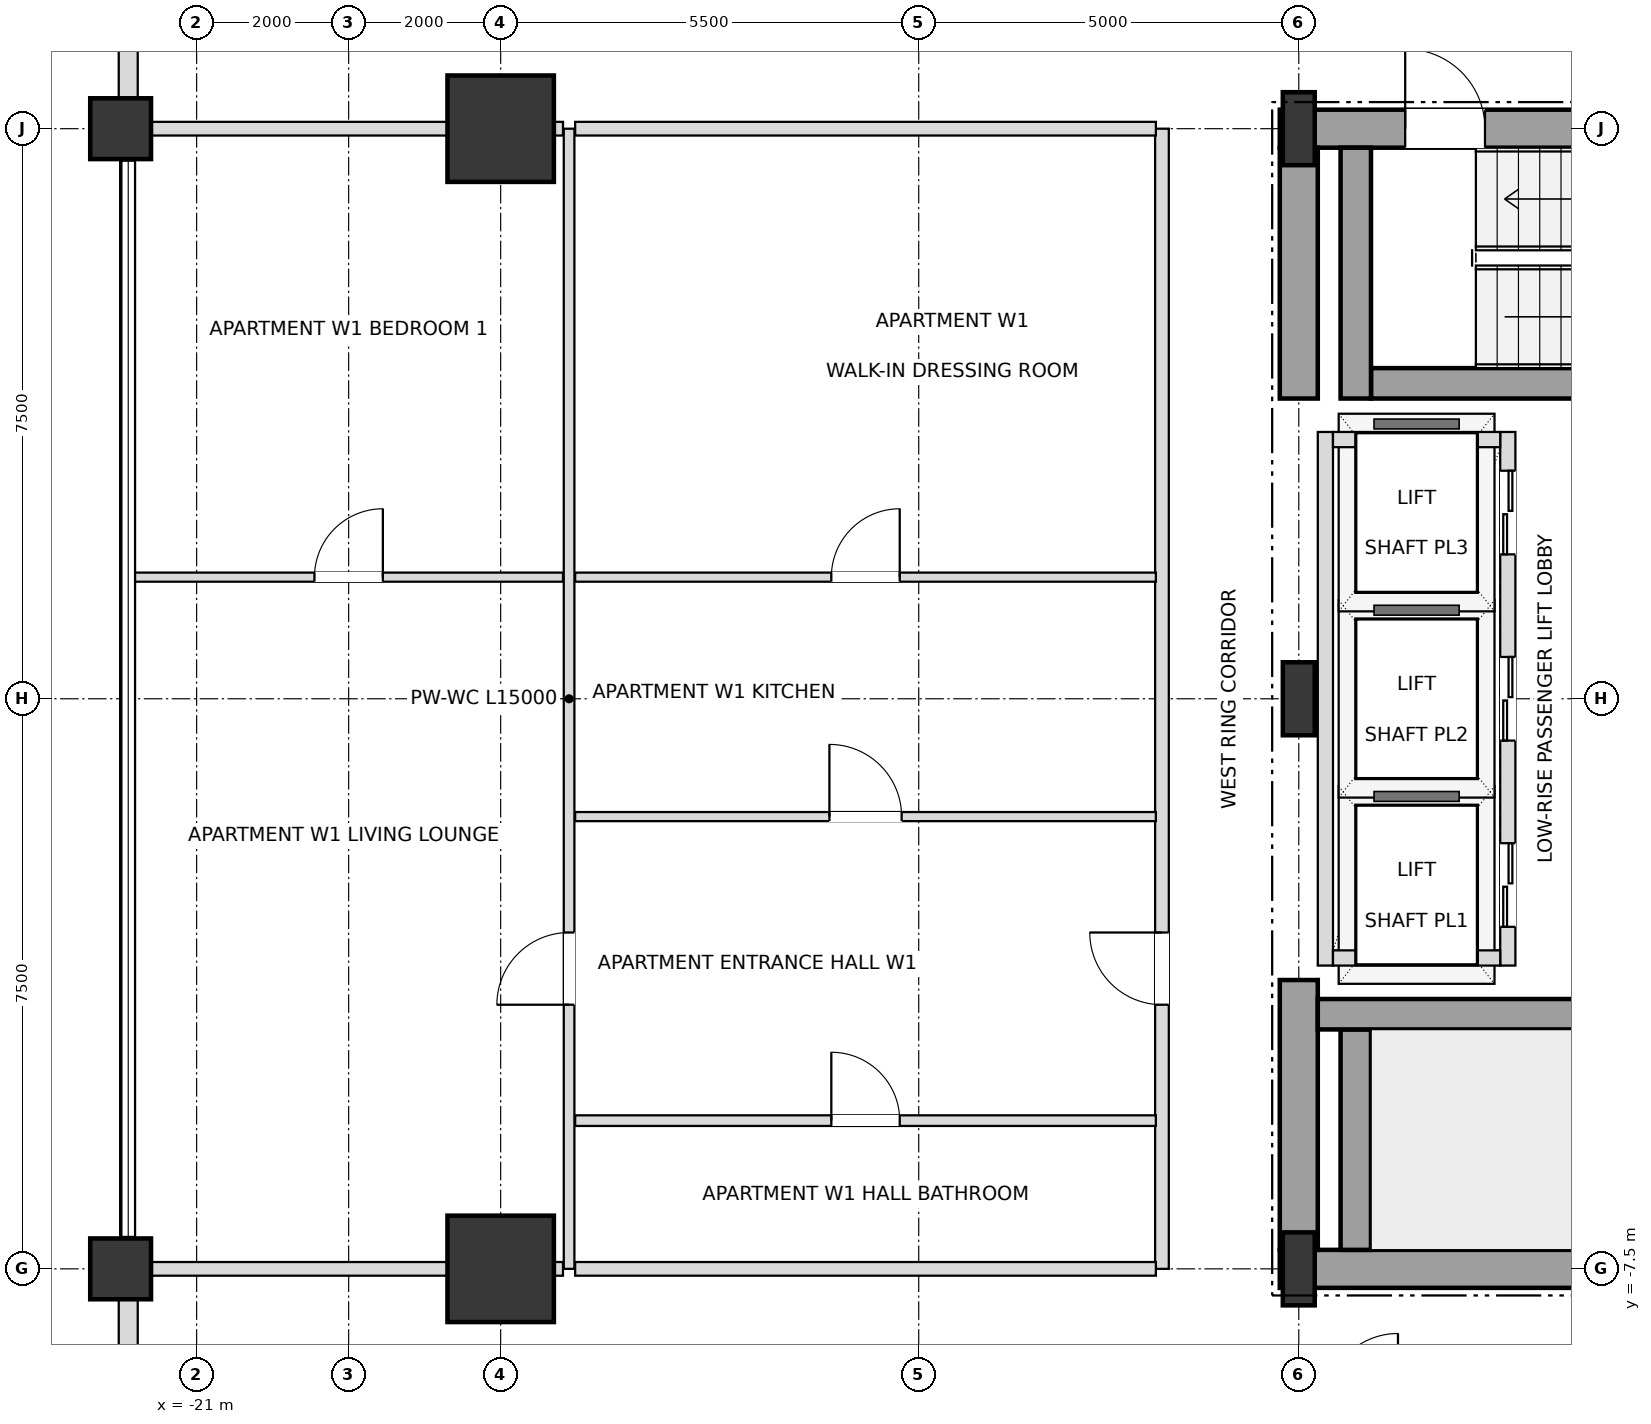
"""IFC4 building model, lengths in metres.
Left out: names, types, materials, properties, quantities, classifications, styles, units other than length and angle.
Written with IfcOpenShell. Run it as: python <this file> out.ifc"""

import sys

from ifc_helpers import new_model, si_unit, direction, frame, frame_2d, origin, origin_2d, place, context, subcontext, project, spatial, rectangle, i_section, extrude, element, fill, save


model = new_model("IFC4")
c1 = context("Model", 3, precision=1e-05, world=origin(), true_north=direction((0.0, 1.0)))
c2 = subcontext(c1, "Body", "Model", "MODEL_VIEW")
j1 = project(units=[si_unit("LENGTHUNIT", "METRE"), si_unit("PLANEANGLEUNIT", "RADIAN")], contexts=[c1])
p1 = place(None, origin())
s1 = spatial("IfcSite", under=j1, at=p1, CompositionType="ELEMENT")
p2 = place(p1, origin())
s2 = spatial("IfcBuilding", under=s1, at=p2, CompositionType="ELEMENT")
p3 = place(p2, frame((0.0, 0.0, 46.8)))
s3 = spatial("IfcBuildingStorey", under=s2, at=p3, CompositionType="ELEMENT", Elevation=46.8)
for number, where, z_axis, x_axis in (
    (1, (-6.5, -7.5, 0.0), (0.0, 0.0, 1.0), (1.0, 0.0, 0.0)),
    (2, (-6.5, 0.0, 0.0), (0.0, 0.0, 1.0), (1.0, 0.0, 0.0)),
    (3, (-6.5, 7.5, 0.0), (0.0, 0.0, 1.0), (1.0, 0.0, 0.0)),
):
    element("IfcColumn", number, at=place(p3, frame(where, z_axis=z_axis, x_axis=x_axis)), inside=s3, PredefinedType="COLUMN", context=c2, shape_type="SweptSolid", body=[
        extrude(i_section(OverallWidth=0.42, OverallDepth=0.96, WebThickness=0.022, FlangeThickness=0.034, at=origin_2d()), origin(), (0.0, 0.0, 1.0), 3.6),
    ])
for number, where, z_axis, x_axis in (
    (4, (-17.0, 7.5, 0.0), (0.0, 0.0, 1.0), (1.0, 0.0, 0.0)),
    (5, (-17.0, -7.5, 0.0), (0.0, 0.0, 1.0), (1.0, 0.0, 0.0)),
):
    element("IfcColumn", number, at=place(p3, frame(where, z_axis=z_axis, x_axis=x_axis)), inside=s3, PredefinedType="USERDEFINED", context=c2, shape_type="SweptSolid", body=[
        extrude(rectangle(XDim=1.4, YDim=1.4, at=origin_2d()), origin(), (0.0, 0.0, 1.0), 3.6),
    ])
for number, where, z_axis, x_axis in (
    (6, (-22.0, -7.5, 0.0), (0.0, 0.0, 1.0), (1.0, 0.0, 0.0)),
    (7, (-22.0, 7.5, 0.0), (0.0, 0.0, 1.0), (1.0, 0.0, 0.0)),
):
    element("IfcColumn", number, at=place(p3, frame(where, z_axis=z_axis, x_axis=x_axis)), inside=s3, PredefinedType="COLUMN", context=c2, shape_type="SweptSolid", body=[
        extrude(rectangle(XDim=0.8, YDim=0.8, at=origin_2d()), origin(), (0.0, 0.0, 1.0), 3.6),
    ])
p4 = place(p3, frame((-21.9, 12.605, 0.0), z_axis=(0.0, 0.0, 1.0), x_axis=(0.0, -1.0, 0.0)))
e8 = element("IfcWall", 8, at=p4, inside=s3, PredefinedType="SOLIDWALL", context=c2, shape_type="SweptSolid", body=[
    extrude(rectangle(XDim=4.71, YDim=0.25, at=frame_2d((2.355, 0.0))), origin(), (0.0, 0.0, 1.0), 2.736),
])
p5 = place(p4, frame((1.455, 0.0, 0.72)))
e9 = element("IfcOpeningElement", 9, at=p5, cuts=e8, PredefinedType="OPENING", context=c2, shape_type="SweptSolid", body=[
    extrude(rectangle(XDim=1.8, YDim=1.68, at=frame_2d((0.9, 0.84))), frame((0.0, 0.135, 0.0), z_axis=(0.0, -1.0, 0.0), x_axis=(1.0, 0.0, 0.0)), (0.0, 0.0, 1.0), 0.27),
])
p6 = place(p3, frame((-21.9, -7.895, 0.0), z_axis=(0.0, 0.0, 1.0), x_axis=(0.0, -1.0, 0.0)))
e10 = element("IfcWall", 10, at=p6, inside=s3, PredefinedType="SOLIDWALL", context=c2, shape_type="SweptSolid", body=[
    extrude(rectangle(XDim=4.71, YDim=0.25, at=frame_2d((2.355, 0.0))), origin(), (0.0, 0.0, 1.0), 2.736),
])
p7 = place(p6, frame((1.455, 0.0, 0.72)))
e11 = element("IfcOpeningElement", 11, at=p7, cuts=e10, PredefinedType="OPENING", context=c2, shape_type="SweptSolid", body=[
    extrude(rectangle(XDim=1.8, YDim=1.68, at=frame_2d((0.9, 0.84))), frame((0.0, 0.135, 0.0), z_axis=(0.0, -1.0, 0.0), x_axis=(1.0, 0.0, 0.0)), (0.0, 0.0, 1.0), 0.27),
])
p8 = place(p3, frame((-6.75, -7.5, 0.0), z_axis=(0.0, 0.0, 1.0), x_axis=(1.0, 0.0, 0.0)))
e12 = element("IfcWall", 12, at=p8, inside=s3, PredefinedType="SHEAR", context=c2, shape_type="SweptSolid", body=[
    extrude(rectangle(XDim=6.75, YDim=0.5, at=frame_2d((3.375, 0.0))), origin(), (0.0, 0.0, 1.0), 3.38),
])
p9 = place(p3, frame((-6.75, 7.5, 0.0), z_axis=(0.0, 0.0, 1.0), x_axis=(1.0, 0.0, 0.0)))
e13 = element("IfcWall", 13, at=p9, inside=s3, PredefinedType="SHEAR", context=c2, shape_type="SweptSolid", body=[
    extrude(rectangle(XDim=6.75, YDim=0.5, at=frame_2d((3.375, 0.0))), origin(), (0.0, 0.0, 1.0), 3.38),
])
p10 = place(p9, frame((1.65, 0.0, 0.0)))
e14 = element("IfcOpeningElement", 14, at=p10, cuts=e13, PredefinedType="OPENING", context=c2, shape_type="SweptSolid", body=[
    extrude(rectangle(XDim=1.05, YDim=2.15, at=frame_2d((0.525, 1.075))), frame((0.0, 0.26, 0.0), z_axis=(0.0, -1.0, 0.0), x_axis=(1.0, 0.0, 0.0)), (0.0, 0.0, 1.0), 0.52),
])
p11 = place(p3, frame((-6.5, -7.25, 0.0), z_axis=(0.0, 0.0, 1.0), x_axis=(0.0, 1.0, 0.0)))
e15 = element("IfcWall", 15, at=p11, inside=s3, PredefinedType="SHEAR", context=c2, shape_type="SweptSolid", body=[
    extrude(rectangle(XDim=3.55, YDim=0.5, at=frame_2d((1.775, 0.0))), origin(), (0.0, 0.0, 1.0), 3.38),
])
p12 = place(p3, frame((-6.5, 3.95, 0.0), z_axis=(0.0, 0.0, 1.0), x_axis=(0.0, 1.0, 0.0)))
e16 = element("IfcWall", 16, at=p12, inside=s3, PredefinedType="SHEAR", context=c2, shape_type="SweptSolid", body=[
    extrude(rectangle(XDim=3.3, YDim=0.5, at=frame_2d((1.65, 0.0))), origin(), (0.0, 0.0, 1.0), 3.38),
])
p13 = place(p3, frame((-5.75, -7.25, 0.0), z_axis=(0.0, 0.0, 1.0), x_axis=(0.0, 1.0, 0.0)))
e17 = element("IfcWall", 17, at=p13, inside=s3, PredefinedType="SHEAR", context=c2, shape_type="SweptSolid", body=[
    extrude(rectangle(XDim=2.9, YDim=0.4, at=frame_2d((1.45, 0.0))), origin(), (0.0, 0.0, 1.0), 3.38),
])
p14 = place(p3, frame((-6.25, -4.15, 0.0), z_axis=(0.0, 0.0, 1.0), x_axis=(1.0, 0.0, 0.0)))
e18 = element("IfcWall", 18, at=p14, inside=s3, PredefinedType="SHEAR", context=c2, shape_type="SweptSolid", body=[
    extrude(rectangle(XDim=7.78, YDim=0.4, at=frame_2d((3.89, 0.0))), origin(), (0.0, 0.0, 1.0), 3.38),
])
p15 = place(p3, frame((-5.55, 4.15, 0.0), z_axis=(0.0, 0.0, 1.0), x_axis=(1.0, 0.0, 0.0)))
e19 = element("IfcWall", 19, at=p15, inside=s3, PredefinedType="SHEAR", context=c2, shape_type="SweptSolid", body=[
    extrude(rectangle(XDim=7.08, YDim=0.4, at=frame_2d((3.54, 0.0))), origin(), (0.0, 0.0, 1.0), 3.38),
])
p16 = place(p3, frame((-5.75, 3.95, 0.0), z_axis=(0.0, 0.0, 1.0), x_axis=(0.0, 1.0, 0.0)))
e20 = element("IfcWall", 20, at=p16, inside=s3, PredefinedType="SHEAR", context=c2, shape_type="SweptSolid", body=[
    extrude(rectangle(XDim=3.3, YDim=0.4, at=frame_2d((1.65, 0.0))), origin(), (0.0, 0.0, 1.0), 3.38),
])
p17 = place(p3, frame((-3.75, -3.51, 0.0), z_axis=(0.0, 0.0, 1.0), x_axis=(0.0, 1.0, 0.0)))
e21 = element("IfcWall", 21, at=p17, inside=s3, PredefinedType="SOLIDWALL", context=c2, shape_type="SweptSolid", body=[
    extrude(rectangle(XDim=7.02, YDim=0.2, at=frame_2d((3.51, 0.0))), origin(), (0.0, 0.0, 1.0), 3.38),
])
p18 = place(p17, frame((0.51, 0.0, 0.0)))
e22 = element("IfcOpeningElement", 22, at=p18, cuts=e21, PredefinedType="OPENING", context=c2, shape_type="SweptSolid", body=[
    extrude(rectangle(XDim=1.1, YDim=2.15, at=frame_2d((0.55, 1.075))), frame((0.0, 0.11, 0.0), z_axis=(0.0, -1.0, 0.0), x_axis=(1.0, 0.0, 0.0)), (0.0, 0.0, 1.0), 0.22),
])
p19 = place(p17, frame((2.96, 0.0, 0.0)))
e23 = element("IfcOpeningElement", 23, at=p19, cuts=e21, PredefinedType="OPENING", context=c2, shape_type="SweptSolid", body=[
    extrude(rectangle(XDim=1.1, YDim=2.15, at=frame_2d((0.55, 1.075))), frame((0.0, 0.11, 0.0), z_axis=(0.0, -1.0, 0.0), x_axis=(1.0, 0.0, 0.0)), (0.0, 0.0, 1.0), 0.22),
])
p20 = place(p17, frame((5.41, 0.0, 0.0)))
e24 = element("IfcOpeningElement", 24, at=p20, cuts=e21, PredefinedType="OPENING", context=c2, shape_type="SweptSolid", body=[
    extrude(rectangle(XDim=1.1, YDim=2.15, at=frame_2d((0.55, 1.075))), frame((0.0, 0.11, 0.0), z_axis=(0.0, -1.0, 0.0), x_axis=(1.0, 0.0, 0.0)), (0.0, 0.0, 1.0), 0.22),
])
p21 = place(p3, frame((-6.15, -3.51, 0.0), z_axis=(0.0, 0.0, 1.0), x_axis=(0.0, 1.0, 0.0)))
e25 = element("IfcWall", 25, at=p21, inside=s3, PredefinedType="SOLIDWALL", context=c2, shape_type="SweptSolid", body=[
    extrude(rectangle(XDim=7.02, YDim=0.2, at=frame_2d((3.51, 0.0))), origin(), (0.0, 0.0, 1.0), 3.38),
])
for number, where, z_axis, x_axis in (
    (26, (-6.05, -3.41, 0.0), (0.0, 0.0, 1.0), (1.0, 0.0, 0.0)),
    (27, (-6.05, 3.41, 0.0), (0.0, 0.0, 1.0), (1.0, 0.0, 0.0)),
):
    element("IfcWall", number, at=place(p3, frame(where, z_axis=z_axis, x_axis=x_axis)), inside=s3, PredefinedType="SOLIDWALL", context=c2, shape_type="SweptSolid", body=[
        extrude(rectangle(XDim=2.2, YDim=0.2, at=frame_2d((1.1, 0.0))), origin(), (0.0, 0.0, 1.0), 3.38),
    ])
p22 = place(p3, frame((-16.1, -7.5, 0.0), z_axis=(0.0, 0.0, 1.0), x_axis=(0.0, 1.0, 0.0)))
e28 = element("IfcWall", 28, at=p22, inside=s3, PredefinedType="PARTITIONING", context=c2, shape_type="SweptSolid", body=[
    extrude(rectangle(XDim=15.0, YDim=0.14, at=frame_2d((7.5, 0.0))), origin(), (0.0, 0.0, 1.0), 3.38),
])
p23 = place(p22, frame((3.475, 0.0, 0.0)))
e29 = element("IfcOpeningElement", 29, at=p23, cuts=e28, PredefinedType="OPENING", context=c2, shape_type="SweptSolid", body=[
    extrude(rectangle(XDim=0.95, YDim=2.1, at=frame_2d((0.475, 1.05))), frame((0.0, 0.08, 0.0), z_axis=(0.0, -1.0, 0.0), x_axis=(1.0, 0.0, 0.0)), (0.0, 0.0, 1.0), 0.16),
])
p24 = place(p3, frame((-8.3, -7.5, 0.0), z_axis=(0.0, 0.0, 1.0), x_axis=(0.0, 1.0, 0.0)))
e30 = element("IfcWall", 30, at=p24, inside=s3, PredefinedType="PARTITIONING", context=c2, shape_type="SweptSolid", body=[
    extrude(rectangle(XDim=15.0, YDim=0.18, at=frame_2d((7.5, 0.0))), origin(), (0.0, 0.0, 1.0), 3.38),
])
p25 = place(p24, frame((3.475, 0.0, 0.0)))
e31 = element("IfcOpeningElement", 31, at=p25, cuts=e30, PredefinedType="OPENING", context=c2, shape_type="SweptSolid", body=[
    extrude(rectangle(XDim=0.95, YDim=2.15, at=frame_2d((0.475, 1.075))), frame((0.0, 0.1, 0.0), z_axis=(0.0, -1.0, 0.0), x_axis=(1.0, 0.0, 0.0)), (0.0, 0.0, 1.0), 0.2),
])
p26 = place(p3, frame((-21.9, -7.5, 0.0), z_axis=(0.0, 0.0, 1.0), x_axis=(1.0, 0.0, 0.0)))
e32 = element("IfcWall", 32, at=p26, inside=s3, PredefinedType="PARTITIONING", context=c2, shape_type="SweptSolid", body=[
    extrude(rectangle(XDim=5.72, YDim=0.18, at=frame_2d((2.86, 0.0))), origin(), (0.0, 0.0, 1.0), 2.816),
])
p27 = place(p3, frame((-16.02, -7.5, 0.0), z_axis=(0.0, 0.0, 1.0), x_axis=(1.0, 0.0, 0.0)))
e33 = element("IfcWall", 33, at=p27, inside=s3, PredefinedType="PARTITIONING", context=c2, shape_type="SweptSolid", body=[
    extrude(rectangle(XDim=7.64, YDim=0.18, at=frame_2d((3.82, 0.0))), origin(), (0.0, 0.0, 1.0), 2.816),
])
p28 = place(p3, frame((-16.02, -5.55, 0.0), z_axis=(0.0, 0.0, 1.0), x_axis=(1.0, 0.0, 0.0)))
e34 = element("IfcWall", 34, at=p28, inside=s3, PredefinedType="PARTITIONING", context=c2, shape_type="SweptSolid", body=[
    extrude(rectangle(XDim=7.64, YDim=0.14, at=frame_2d((3.82, 0.0))), origin(), (0.0, 0.0, 1.0), 2.948),
])
p29 = place(p28, frame((3.37, 0.0, 0.0)))
e35 = element("IfcOpeningElement", 35, at=p29, cuts=e34, PredefinedType="OPENING", context=c2, shape_type="SweptSolid", body=[
    extrude(rectangle(XDim=0.9, YDim=2.1, at=frame_2d((0.45, 1.05))), frame((0.0, 0.08, 0.0), z_axis=(0.0, -1.0, 0.0), x_axis=(1.0, 0.0, 0.0)), (0.0, 0.0, 1.0), 0.16),
])
p30 = place(p3, frame((-16.02, -1.55, 0.0), z_axis=(0.0, 0.0, 1.0), x_axis=(1.0, 0.0, 0.0)))
e36 = element("IfcWall", 36, at=p30, inside=s3, PredefinedType="PARTITIONING", context=c2, shape_type="SweptSolid", body=[
    extrude(rectangle(XDim=7.64, YDim=0.12, at=frame_2d((3.82, 0.0))), origin(), (0.0, 0.0, 1.0), 2.948),
])
p31 = place(p30, frame((3.345, 0.0, 0.0)))
e37 = element("IfcOpeningElement", 37, at=p31, cuts=e36, PredefinedType="OPENING", context=c2, shape_type="SweptSolid", body=[
    extrude(rectangle(XDim=0.95, YDim=2.1, at=frame_2d((0.475, 1.05))), frame((0.0, 0.07, 0.0), z_axis=(0.0, -1.0, 0.0), x_axis=(1.0, 0.0, 0.0)), (0.0, 0.0, 1.0), 0.14),
])
p32 = place(p3, frame((-21.82, 1.6, 0.0), z_axis=(0.0, 0.0, 1.0), x_axis=(1.0, 0.0, 0.0)))
e38 = element("IfcWall", 38, at=p32, inside=s3, PredefinedType="PARTITIONING", context=c2, shape_type="SweptSolid", body=[
    extrude(rectangle(XDim=5.64, YDim=0.12, at=frame_2d((2.82, 0.0))), origin(), (0.0, 0.0, 1.0), 2.816),
])
p33 = place(p32, frame((2.37, 0.0, 0.0)))
e39 = element("IfcOpeningElement", 39, at=p33, cuts=e38, PredefinedType="OPENING", context=c2, shape_type="SweptSolid", body=[
    extrude(rectangle(XDim=0.9, YDim=2.1, at=frame_2d((0.45, 1.05))), frame((0.0, 0.07, 0.0), z_axis=(0.0, -1.0, 0.0), x_axis=(1.0, 0.0, 0.0)), (0.0, 0.0, 1.0), 0.14),
])
p34 = place(p3, frame((-16.02, 1.6, 0.0), z_axis=(0.0, 0.0, 1.0), x_axis=(1.0, 0.0, 0.0)))
e40 = element("IfcWall", 40, at=p34, inside=s3, PredefinedType="PARTITIONING", context=c2, shape_type="SweptSolid", body=[
    extrude(rectangle(XDim=7.64, YDim=0.12, at=frame_2d((3.82, 0.0))), origin(), (0.0, 0.0, 1.0), 2.948),
])
p35 = place(p34, frame((3.37, 0.0, 0.0)))
e41 = element("IfcOpeningElement", 41, at=p35, cuts=e40, PredefinedType="OPENING", context=c2, shape_type="SweptSolid", body=[
    extrude(rectangle(XDim=0.9, YDim=2.1, at=frame_2d((0.45, 1.05))), frame((0.0, 0.07, 0.0), z_axis=(0.0, -1.0, 0.0), x_axis=(1.0, 0.0, 0.0)), (0.0, 0.0, 1.0), 0.14),
])
p36 = place(p3, frame((-21.9, 7.5, 0.0), z_axis=(0.0, 0.0, 1.0), x_axis=(1.0, 0.0, 0.0)))
e42 = element("IfcWall", 42, at=p36, inside=s3, PredefinedType="PARTITIONING", context=c2, shape_type="SweptSolid", body=[
    extrude(rectangle(XDim=5.72, YDim=0.18, at=frame_2d((2.86, 0.0))), origin(), (0.0, 0.0, 1.0), 2.816),
])
p37 = place(p3, frame((-16.02, 7.5, 0.0), z_axis=(0.0, 0.0, 1.0), x_axis=(1.0, 0.0, 0.0)))
e43 = element("IfcWall", 43, at=p37, inside=s3, PredefinedType="PARTITIONING", context=c2, shape_type="SweptSolid", body=[
    extrude(rectangle(XDim=7.64, YDim=0.18, at=frame_2d((3.82, 0.0))), origin(), (0.0, 0.0, 1.0), 2.816),
])
p38 = place(p10, origin())
e44 = element("IfcDoor", 44, at=p38, inside=s3, OperationType="SINGLE_SWING_LEFT", PredefinedType="DOOR", context=c2, shape_type="SweptSolid", body=[
    extrude(rectangle(XDim=1.05, YDim=2.15, at=frame_2d((0.525, 1.075))), frame((0.0, 0.025, 0.0), z_axis=(0.0, -1.0, 0.0), x_axis=(1.0, 0.0, 0.0)), (0.0, 0.0, 1.0), 0.05),
])
fill(e14, e44)
p39 = place(p18, origin())
e45 = element("IfcDoor", 45, at=p39, inside=s3, OperationType="DOUBLE_DOOR_SLIDING", PredefinedType="DOOR", context=c2, shape_type="SweptSolid", body=[
    extrude(rectangle(XDim=1.1, YDim=2.15, at=frame_2d((0.55, 1.075))), frame((0.0, 0.025, 0.0), z_axis=(0.0, -1.0, 0.0), x_axis=(1.0, 0.0, 0.0)), (0.0, 0.0, 1.0), 0.05),
])
fill(e22, e45)
p40 = place(p19, origin())
e46 = element("IfcDoor", 46, at=p40, inside=s3, OperationType="DOUBLE_DOOR_SLIDING", PredefinedType="DOOR", context=c2, shape_type="SweptSolid", body=[
    extrude(rectangle(XDim=1.1, YDim=2.15, at=frame_2d((0.55, 1.075))), frame((0.0, 0.025, 0.0), z_axis=(0.0, -1.0, 0.0), x_axis=(1.0, 0.0, 0.0)), (0.0, 0.0, 1.0), 0.05),
])
fill(e23, e46)
p41 = place(p20, origin())
e47 = element("IfcDoor", 47, at=p41, inside=s3, OperationType="DOUBLE_DOOR_SLIDING", PredefinedType="DOOR", context=c2, shape_type="SweptSolid", body=[
    extrude(rectangle(XDim=1.1, YDim=2.15, at=frame_2d((0.55, 1.075))), frame((0.0, 0.025, 0.0), z_axis=(0.0, -1.0, 0.0), x_axis=(1.0, 0.0, 0.0)), (0.0, 0.0, 1.0), 0.05),
])
fill(e24, e47)
p42 = place(p29, origin())
e48 = element("IfcDoor", 48, at=p42, inside=s3, OperationType="SINGLE_SWING_LEFT", PredefinedType="DOOR", context=c2, shape_type="SweptSolid", body=[
    extrude(rectangle(XDim=0.9, YDim=2.1, at=frame_2d((0.45, 1.05))), frame((0.0, 0.025, 0.0), z_axis=(0.0, -1.0, 0.0), x_axis=(1.0, 0.0, 0.0)), (0.0, 0.0, 1.0), 0.05),
])
fill(e35, e48)
p43 = place(p25, origin())
e49 = element("IfcDoor", 49, at=p43, inside=s3, OperationType="SINGLE_SWING_RIGHT", PredefinedType="DOOR", context=c2, shape_type="SweptSolid", body=[
    extrude(rectangle(XDim=0.95, YDim=2.15, at=frame_2d((0.475, 1.075))), frame((0.0, 0.025, 0.0), z_axis=(0.0, -1.0, 0.0), x_axis=(1.0, 0.0, 0.0)), (0.0, 0.0, 1.0), 0.05),
])
fill(e31, e49)
p44 = place(p31, origin())
e50 = element("IfcDoor", 50, at=p44, inside=s3, OperationType="SINGLE_SWING_LEFT", PredefinedType="DOOR", context=c2, shape_type="SweptSolid", body=[
    extrude(rectangle(XDim=0.95, YDim=2.1, at=frame_2d((0.475, 1.05))), frame((0.0, 0.025, 0.0), z_axis=(0.0, -1.0, 0.0), x_axis=(1.0, 0.0, 0.0)), (0.0, 0.0, 1.0), 0.05),
])
fill(e37, e50)
p45 = place(p35, origin())
e51 = element("IfcDoor", 51, at=p45, inside=s3, OperationType="SINGLE_SWING_RIGHT", PredefinedType="DOOR", context=c2, shape_type="SweptSolid", body=[
    extrude(rectangle(XDim=0.9, YDim=2.1, at=frame_2d((0.45, 1.05))), frame((0.0, 0.025, 0.0), z_axis=(0.0, -1.0, 0.0), x_axis=(1.0, 0.0, 0.0)), (0.0, 0.0, 1.0), 0.05),
])
fill(e41, e51)
p46 = place(p23, origin())
e52 = element("IfcDoor", 52, at=p46, inside=s3, OperationType="SINGLE_SWING_LEFT", PredefinedType="DOOR", context=c2, shape_type="SweptSolid", body=[
    extrude(rectangle(XDim=0.95, YDim=2.1, at=frame_2d((0.475, 1.05))), frame((0.0, 0.025, 0.0), z_axis=(0.0, -1.0, 0.0), x_axis=(1.0, 0.0, 0.0)), (0.0, 0.0, 1.0), 0.05),
])
fill(e29, e52)
p47 = place(p33, origin())
e53 = element("IfcDoor", 53, at=p47, inside=s3, OperationType="SINGLE_SWING_RIGHT", PredefinedType="DOOR", context=c2, shape_type="SweptSolid", body=[
    extrude(rectangle(XDim=0.9, YDim=2.1, at=frame_2d((0.45, 1.05))), frame((0.0, 0.025, 0.0), z_axis=(0.0, -1.0, 0.0), x_axis=(1.0, 0.0, 0.0)), (0.0, 0.0, 1.0), 0.05),
])
fill(e39, e53)
save(model, sys.argv[1])
